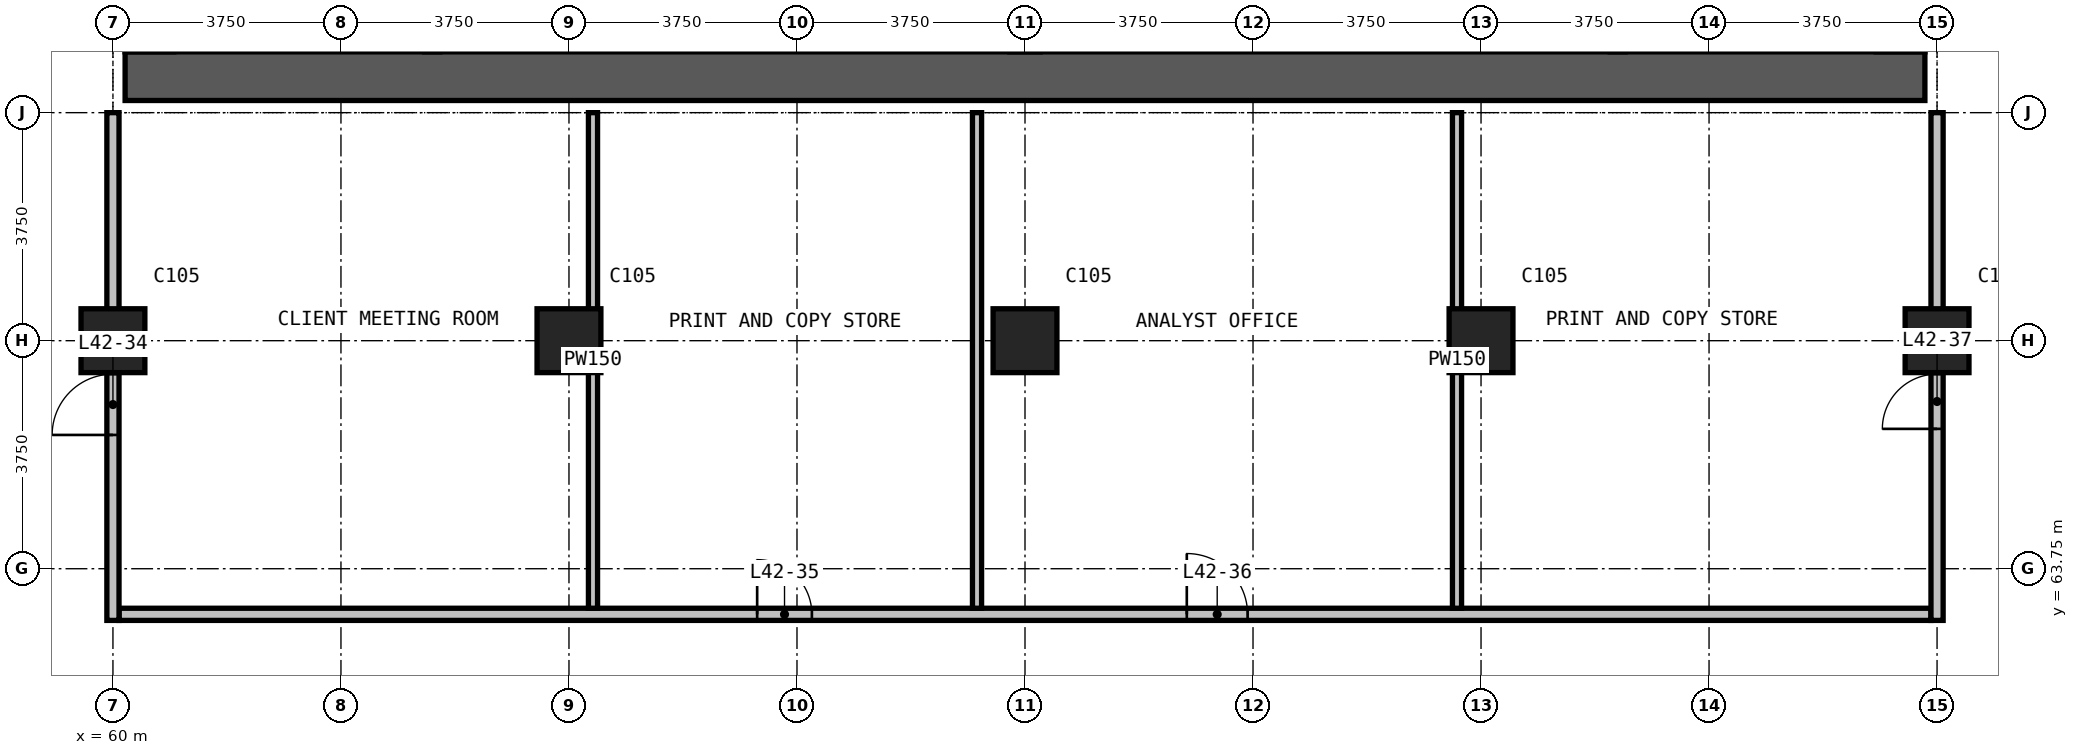
"""IFC4 building model, lengths in metres.
Left out: names, types, materials, properties, quantities, classifications, styles, units other than length and angle.
Written with IfcOpenShell. Run it as: python <this file> out.ifc"""

import sys

from ifc_helpers import new_model, si_unit, direction, frame, frame_2d, origin, origin_2d, place, context, subcontext, project, spatial, rectangle, extrude, element, fill, save


model = new_model("IFC4")
c1 = context("Model", 3, precision=1e-05, world=origin(), true_north=direction((0.0, 1.0)))
c2 = subcontext(c1, "Body", "Model", "MODEL_VIEW")
j1 = project(units=[si_unit("LENGTHUNIT", "METRE"), si_unit("PLANEANGLEUNIT", "RADIAN")], contexts=[c1])
p1 = place(None, origin())
s1 = spatial("IfcSite", under=j1, at=p1, CompositionType="ELEMENT")
p2 = place(p1, origin())
s2 = spatial("IfcBuilding", under=s1, at=p2, CompositionType="ELEMENT")
p3 = place(p2, frame((0.0, 0.0, 165.7)))
s3 = spatial("IfcBuildingStorey", under=s2, at=p3, CompositionType="ELEMENT", Elevation=165.7)
for number, where, z_axis, x_axis in (
    (1, (60.0, 67.5, 0.0), (0.0, 0.0, 1.0), (1.0, 0.0, 0.0)),
    (2, (67.5, 67.5, 0.0), (0.0, 0.0, 1.0), (1.0, 0.0, 0.0)),
    (3, (75.0, 67.5, 0.0), (0.0, 0.0, 1.0), (1.0, 0.0, 0.0)),
    (4, (82.5, 67.5, 0.0), (0.0, 0.0, 1.0), (1.0, 0.0, 0.0)),
    (5, (90.0, 67.5, 0.0), (0.0, 0.0, 1.0), (1.0, 0.0, 0.0)),
):
    element("IfcColumn", number, at=place(p3, frame(where, z_axis=z_axis, x_axis=x_axis)), inside=s3, PredefinedType="COLUMN", context=c2, shape_type="SweptSolid", body=[
        extrude(rectangle(XDim=1.05, YDim=1.05, at=origin_2d()), origin(), (0.0, 0.0, 1.0), 3.6),
    ])
p4 = place(p3, frame((60.2, 71.85, 0.0), z_axis=(0.0, 0.0, 1.0), x_axis=(1.0, 0.0, 0.0)))
e6 = element("IfcWall", 6, at=p4, inside=s3, PredefinedType="SHEAR", context=c2, shape_type="SweptSolid", body=[
    extrude(rectangle(XDim=29.6, YDim=0.8, at=frame_2d((14.8, 0.0))), origin(), (0.0, 0.0, 1.0), 3.6),
])
p5 = place(p3, frame((60.1, 63.0, 0.0), z_axis=(0.0, 0.0, 1.0), x_axis=(1.0, 0.0, 0.0)))
e7 = element("IfcWall", 7, at=p5, inside=s3, PredefinedType="PARTITIONING", context=c2, shape_type="SweptSolid", body=[
    extrude(rectangle(XDim=29.8, YDim=0.2, at=frame_2d((14.9, 0.0))), origin(), (0.0, 0.0, 1.0), 3.3),
])
p6 = place(p5, frame((10.495, 0.0, 0.0)))
e8 = element("IfcOpeningElement", 8, at=p6, cuts=e7, PredefinedType="OPENING", context=c2, shape_type="SweptSolid", body=[
    extrude(rectangle(XDim=0.9, YDim=2.2, at=frame_2d((0.45, 1.1))), frame((0.0, 0.11, 0.0), z_axis=(0.0, -1.0, 0.0), x_axis=(1.0, 0.0, 0.0)), (0.0, 0.0, 1.0), 0.22),
])
p7 = place(p5, frame((17.561, 0.0, 0.0)))
e9 = element("IfcOpeningElement", 9, at=p7, cuts=e7, PredefinedType="OPENING", context=c2, shape_type="SweptSolid", body=[
    extrude(rectangle(XDim=1.0, YDim=2.2, at=frame_2d((0.5, 1.1))), frame((0.0, 0.11, 0.0), z_axis=(0.0, -1.0, 0.0), x_axis=(1.0, 0.0, 0.0)), (0.0, 0.0, 1.0), 0.22),
])
p8 = place(p3, frame((60.0, 62.9, 0.0), z_axis=(0.0, 0.0, 1.0), x_axis=(0.0, 1.0, 0.0)))
e10 = element("IfcWall", 10, at=p8, inside=s3, PredefinedType="PARTITIONING", context=c2, shape_type="SweptSolid", body=[
    extrude(rectangle(XDim=8.35, YDim=0.2, at=frame_2d((4.175, 0.0))), origin(), (0.0, 0.0, 1.0), 3.3),
])
p9 = place(p8, frame((3.05, 0.0, 0.0)))
e11 = element("IfcOpeningElement", 11, at=p9, cuts=e10, PredefinedType="OPENING", context=c2, shape_type="SweptSolid", body=[
    extrude(rectangle(XDim=1.0, YDim=2.2, at=frame_2d((0.5, 1.1))), frame((0.0, 0.11, 0.0), z_axis=(0.0, -1.0, 0.0), x_axis=(1.0, 0.0, 0.0)), (0.0, 0.0, 1.0), 0.22),
])
p10 = place(p3, frame((90.0, 62.9, 0.0), z_axis=(0.0, 0.0, 1.0), x_axis=(0.0, 1.0, 0.0)))
e12 = element("IfcWall", 12, at=p10, inside=s3, PredefinedType="PARTITIONING", context=c2, shape_type="SweptSolid", body=[
    extrude(rectangle(XDim=8.35, YDim=0.2, at=frame_2d((4.175, 0.0))), origin(), (0.0, 0.0, 1.0), 3.3),
])
p11 = place(p10, frame((3.15, 0.0, 0.0)))
e13 = element("IfcOpeningElement", 13, at=p11, cuts=e12, PredefinedType="OPENING", context=c2, shape_type="SweptSolid", body=[
    extrude(rectangle(XDim=0.9, YDim=2.2, at=frame_2d((0.45, 1.1))), frame((0.0, 0.11, 0.0), z_axis=(0.0, -1.0, 0.0), x_axis=(1.0, 0.0, 0.0)), (0.0, 0.0, 1.0), 0.22),
])
for number, where, z_axis, x_axis in (
    (14, (67.895, 63.1, 0.0), (0.0, 0.0, 1.0), (0.0, 1.0, 0.0)),
    (15, (74.211, 63.1, 0.0), (0.0, 0.0, 1.0), (0.0, 1.0, 0.0)),
    (16, (82.105, 63.1, 0.0), (0.0, 0.0, 1.0), (0.0, 1.0, 0.0)),
):
    element("IfcWall", number, at=place(p3, frame(where, z_axis=z_axis, x_axis=x_axis)), inside=s3, PredefinedType="PARTITIONING", context=c2, shape_type="SweptSolid", body=[
        extrude(rectangle(XDim=8.15, YDim=0.15, at=frame_2d((4.075, 0.0))), origin(), (0.0, 0.0, 1.0), 3.3),
    ])
p12 = place(p9, origin())
e17 = element("IfcDoor", 17, at=p12, inside=s3, OperationType="SINGLE_SWING_RIGHT", PredefinedType="DOOR", context=c2, shape_type="SweptSolid", body=[
    extrude(rectangle(XDim=1.0, YDim=2.2, at=frame_2d((0.5, 1.1))), frame((0.0, 0.025, 0.0), z_axis=(0.0, -1.0, 0.0), x_axis=(1.0, 0.0, 0.0)), (0.0, 0.0, 1.0), 0.05),
])
fill(e11, e17)
p13 = place(p6, origin())
e18 = element("IfcDoor", 18, at=p13, inside=s3, OperationType="SINGLE_SWING_RIGHT", PredefinedType="DOOR", context=c2, shape_type="SweptSolid", body=[
    extrude(rectangle(XDim=0.9, YDim=2.2, at=frame_2d((0.45, 1.1))), frame((0.0, 0.025, 0.0), z_axis=(0.0, -1.0, 0.0), x_axis=(1.0, 0.0, 0.0)), (0.0, 0.0, 1.0), 0.05),
])
fill(e8, e18)
p14 = place(p7, origin())
e19 = element("IfcDoor", 19, at=p14, inside=s3, OperationType="SINGLE_SWING_RIGHT", PredefinedType="DOOR", context=c2, shape_type="SweptSolid", body=[
    extrude(rectangle(XDim=1.0, YDim=2.2, at=frame_2d((0.5, 1.1))), frame((0.0, 0.025, 0.0), z_axis=(0.0, -1.0, 0.0), x_axis=(1.0, 0.0, 0.0)), (0.0, 0.0, 1.0), 0.05),
])
fill(e9, e19)
p15 = place(p11, origin())
e20 = element("IfcDoor", 20, at=p15, inside=s3, OperationType="SINGLE_SWING_LEFT", PredefinedType="DOOR", context=c2, shape_type="SweptSolid", body=[
    extrude(rectangle(XDim=0.9, YDim=2.2, at=frame_2d((0.45, 1.1))), frame((0.0, 0.025, 0.0), z_axis=(0.0, -1.0, 0.0), x_axis=(1.0, 0.0, 0.0)), (0.0, 0.0, 1.0), 0.05),
])
fill(e13, e20)
save(model, sys.argv[1])
